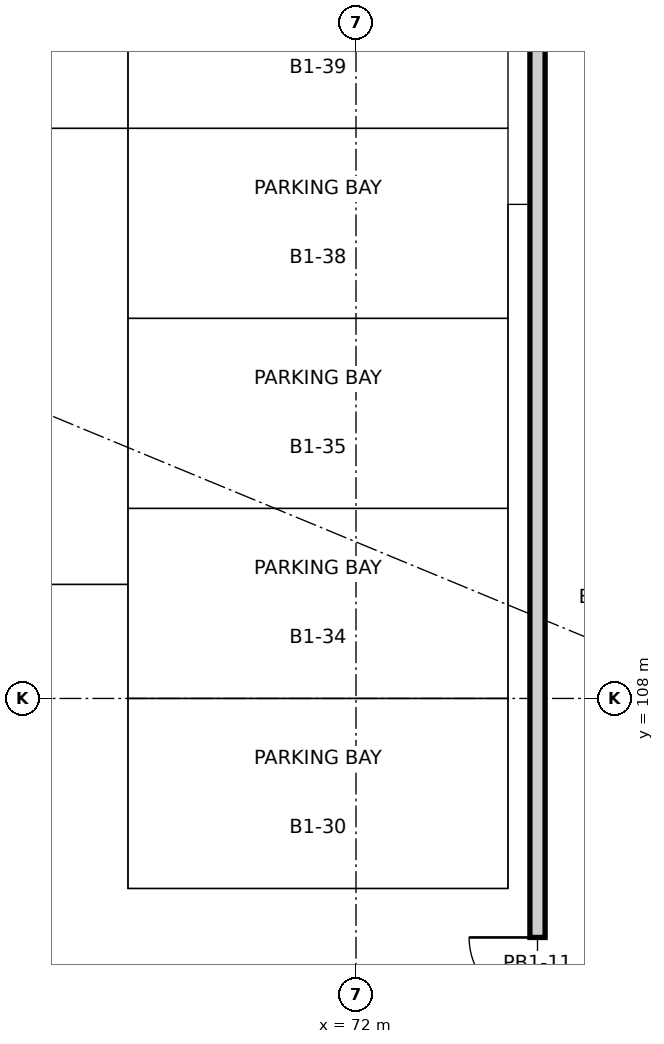
"""IFC4 building model, lengths in metres.
Left out: names, types, materials, properties, quantities, classifications, styles, units other than length and angle.
Written with IfcOpenShell. Run it as: python <this file> out.ifc"""

import sys

from ifc_helpers import new_model, si_unit, direction, frame, frame_2d, origin, place, context, subcontext, project, spatial, rectangle, extrude, element, fill, save


model = new_model("IFC4")
c1 = context("Model", 3, precision=1e-05, world=origin(), true_north=direction((0.0, 1.0)))
c2 = subcontext(c1, "Body", "Model", "MODEL_VIEW")
j1 = project(units=[si_unit("LENGTHUNIT", "METRE"), si_unit("PLANEANGLEUNIT", "RADIAN")], contexts=[c1])
p1 = place(None, origin())
s1 = spatial("IfcSite", under=j1, at=p1, CompositionType="ELEMENT")
p2 = place(p1, origin())
s2 = spatial("IfcBuilding", under=s1, at=p2, CompositionType="ELEMENT")
p3 = place(p2, frame((0.0, 0.0, -4.2)))
s3 = spatial("IfcBuildingStorey", under=s2, at=p3, CompositionType="ELEMENT", Elevation=-4.2)
p4 = place(p3, frame((74.388, 88.791, 0.0), z_axis=(0.0, 0.0, 1.0), x_axis=(0.0, 1.0, 0.0)))
e1 = element("IfcWall", 1, at=p4, inside=s3, PredefinedType="SOLIDWALL", context=c2, shape_type="SweptSolid", body=[
    extrude(rectangle(XDim=30.329, YDim=0.2, at=frame_2d((15.165, 0.0))), origin(), (0.0, 0.0, 1.0), 3.75),
])
p5 = place(p4, frame((14.264, 0.0, 0.0)))
e2 = element("IfcOpeningElement", 2, at=p5, cuts=e1, PredefinedType="OPENING", context=c2, shape_type="SweptSolid", body=[
    extrude(rectangle(XDim=1.8, YDim=2.1, at=frame_2d((0.9, 1.05))), frame((0.0, 0.11, 0.0), z_axis=(0.0, -1.0, 0.0), x_axis=(1.0, 0.0, 0.0)), (0.0, 0.0, 1.0), 0.22),
])
p6 = place(p5, origin())
e3 = element("IfcDoor", 3, at=p6, inside=s3, OperationType="DOUBLE_DOOR_SINGLE_SWING", PredefinedType="DOOR", context=c2, shape_type="SweptSolid", body=[
    extrude(rectangle(XDim=1.8, YDim=2.1, at=frame_2d((0.9, 1.05))), frame((0.0, 0.025, 0.0), z_axis=(0.0, -1.0, 0.0), x_axis=(1.0, 0.0, 0.0)), (0.0, 0.0, 1.0), 0.05),
])
fill(e2, e3)
save(model, sys.argv[1])
